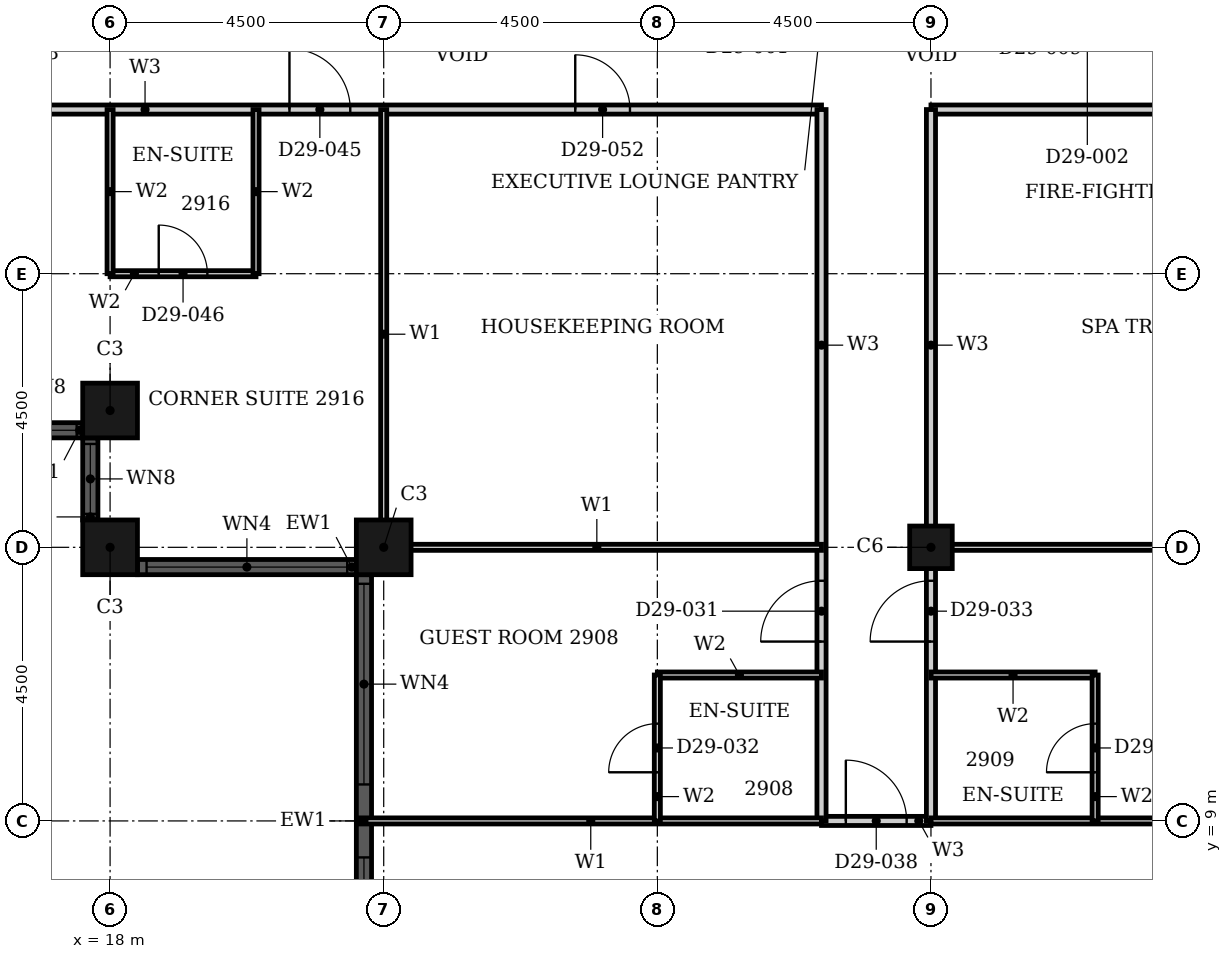
"""IFC4 building model, lengths in metres.
Left out: names, types, materials, properties, quantities, classifications, styles, units other than length and angle.
Written with IfcOpenShell. Run it as: python <this file> out.ifc"""

import sys

from ifc_helpers import new_model, si_unit, direction, frame, frame_2d, origin, origin_2d, place, context, subcontext, project, spatial, rectangle, hollow_rectangle, extrude, element, fill, save


model = new_model("IFC4")
c1 = context("Model", 3, precision=1e-05, world=origin(), true_north=direction((0.0, 1.0)))
c2 = subcontext(c1, "Body", "Model", "MODEL_VIEW")
j1 = project(units=[si_unit("LENGTHUNIT", "METRE"), si_unit("PLANEANGLEUNIT", "RADIAN")], contexts=[c1])
p1 = place(None, origin())
s1 = spatial("IfcSite", under=j1, at=p1, CompositionType="ELEMENT")
p2 = place(p1, origin())
s2 = spatial("IfcBuilding", under=s1, at=p2, CompositionType="ELEMENT")
p3 = place(p2, frame((0.0, 0.0, 118.8)))
s3 = spatial("IfcBuildingStorey", under=s2, at=p3, CompositionType="ELEMENT", Elevation=118.8)
for number, where, z_axis, x_axis in (
    (1, (18.0, 15.75, 0.0), (0.0, 0.0, 1.0), (1.0, 0.0, 0.0)),
    (2, (18.0, 13.5, 0.0), (0.0, 0.0, 1.0), (1.0, 0.0, 0.0)),
    (3, (22.5, 13.5, 0.0), (0.0, 0.0, 1.0), (1.0, 0.0, 0.0)),
):
    element("IfcColumn", number, at=place(p3, frame(where, z_axis=z_axis, x_axis=x_axis)), inside=s3, PredefinedType="COLUMN", context=c2, shape_type="SweptSolid", body=[
        extrude(hollow_rectangle(XDim=0.9, YDim=0.9, WallThickness=0.028, at=origin_2d()), origin(), (0.0, 0.0, 1.0), 3.6),
    ])
p4 = place(p3, frame((31.5, 13.5, 0.0), z_axis=(0.0, 0.0, 1.0), x_axis=(1.0, 0.0, 0.0)))
e4 = element("IfcColumn", 4, at=p4, inside=s3, PredefinedType="COLUMN", context=c2, shape_type="SweptSolid", body=[
    extrude(hollow_rectangle(XDim=0.7, YDim=0.7, WallThickness=0.022, at=origin_2d()), origin(), (0.0, 0.0, 1.0), 3.6),
])
p5 = place(p3, frame((16.2, 15.425, 0.0), z_axis=(0.0, 0.0, 1.0), x_axis=(1.0, 0.0, 0.0)))
e5 = element("IfcWall", 5, at=p5, inside=s3, PredefinedType="SOLIDWALL", context=c2, shape_type="SweptSolid", body=[
    extrude(rectangle(XDim=1.35, YDim=0.25, at=frame_2d((0.675, 0.0))), origin(), (0.0, 0.0, 1.0), 3.6),
])
p6 = place(p5, frame((0.1, 0.0, 0.9)))
e6 = element("IfcOpeningElement", 6, at=p6, cuts=e5, PredefinedType="OPENING", context=c2, shape_type="SweptSolid", body=[
    extrude(rectangle(XDim=1.15, YDim=2.08, at=frame_2d((0.575, 1.04))), frame((0.0, 0.135, 0.0), z_axis=(0.0, -1.0, 0.0), x_axis=(1.0, 0.0, 0.0)), (0.0, 0.0, 1.0), 0.27),
])
p7 = place(p3, frame((17.675, 15.3, 0.0), z_axis=(0.0, 0.0, 1.0), x_axis=(0.0, -1.0, 0.0)))
e7 = element("IfcWall", 7, at=p7, inside=s3, PredefinedType="SOLIDWALL", context=c2, shape_type="SweptSolid", body=[
    extrude(rectangle(XDim=1.35, YDim=0.25, at=frame_2d((0.675, 0.0))), origin(), (0.0, 0.0, 1.0), 3.6),
])
p8 = place(p7, frame((0.1, 0.0, 0.9)))
e8 = element("IfcOpeningElement", 8, at=p8, cuts=e7, PredefinedType="OPENING", context=c2, shape_type="SweptSolid", body=[
    extrude(rectangle(XDim=1.15, YDim=2.08, at=frame_2d((0.575, 1.04))), frame((0.0, 0.135, 0.0), z_axis=(0.0, -1.0, 0.0), x_axis=(1.0, 0.0, 0.0)), (0.0, 0.0, 1.0), 0.27),
])
p9 = place(p3, frame((18.45, 13.175, 0.0), z_axis=(0.0, 0.0, 1.0), x_axis=(1.0, 0.0, 0.0)))
e9 = element("IfcWall", 9, at=p9, inside=s3, PredefinedType="SOLIDWALL", context=c2, shape_type="SweptSolid", body=[
    extrude(rectangle(XDim=3.6, YDim=0.25, at=frame_2d((1.8, 0.0))), origin(), (0.0, 0.0, 1.0), 3.6),
])
p10 = place(p9, frame((0.15, 0.0, 0.9)))
e10 = element("IfcOpeningElement", 10, at=p10, cuts=e9, PredefinedType="OPENING", context=c2, shape_type="SweptSolid", body=[
    extrude(rectangle(XDim=3.3, YDim=2.08, at=frame_2d((1.65, 1.04))), frame((0.0, 0.135, 0.0), z_axis=(0.0, -1.0, 0.0), x_axis=(1.0, 0.0, 0.0)), (0.0, 0.0, 1.0), 0.27),
])
p11 = place(p3, frame((22.175, 13.05, 0.0), z_axis=(0.0, 0.0, 1.0), x_axis=(0.0, -1.0, 0.0)))
e11 = element("IfcWall", 11, at=p11, inside=s3, PredefinedType="SOLIDWALL", context=c2, shape_type="SweptSolid", body=[
    extrude(rectangle(XDim=8.1, YDim=0.25, at=frame_2d((4.05, 0.0))), origin(), (0.0, 0.0, 1.0), 3.6),
])
p12 = place(p11, frame((0.15, 0.0, 0.9)))
e12 = element("IfcOpeningElement", 12, at=p12, cuts=e11, PredefinedType="OPENING", context=c2, shape_type="SweptSolid", body=[
    extrude(rectangle(XDim=3.3, YDim=2.08, at=frame_2d((1.65, 1.04))), frame((0.0, 0.135, 0.0), z_axis=(0.0, -1.0, 0.0), x_axis=(1.0, 0.0, 0.0)), (0.0, 0.0, 1.0), 0.27),
])
p13 = place(p11, frame((4.65, 0.0, 0.9)))
e13 = element("IfcOpeningElement", 13, at=p13, cuts=e11, PredefinedType="OPENING", context=c2, shape_type="SweptSolid", body=[
    extrude(rectangle(XDim=3.3, YDim=2.08, at=frame_2d((1.65, 1.04))), frame((0.0, 0.135, 0.0), z_axis=(0.0, -1.0, 0.0), x_axis=(1.0, 0.0, 0.0)), (0.0, 0.0, 1.0), 0.27),
])
p14 = place(p3, frame((16.2, 20.7, 0.0), z_axis=(0.0, 0.0, 1.0), x_axis=(1.0, 0.0, 0.0)))
e14 = element("IfcWall", 14, at=p14, inside=s3, PredefinedType="PARTITIONING", context=c2, shape_type="SweptSolid", body=[
    extrude(rectangle(XDim=13.5, YDim=0.15, at=frame_2d((6.75, 0.0))), origin(), (0.0, 0.0, 1.0), 3.3),
])
p15 = place(p14, frame((4.75, 0.0, 0.0)))
e15 = element("IfcOpeningElement", 15, at=p15, cuts=e14, PredefinedType="OPENING", context=c2, shape_type="SweptSolid", body=[
    extrude(rectangle(XDim=1.0, YDim=2.1, at=frame_2d((0.5, 1.05))), frame((0.0, 0.085, 0.0), z_axis=(0.0, -1.0, 0.0), x_axis=(1.0, 0.0, 0.0)), (0.0, 0.0, 1.0), 0.17),
])
p16 = place(p14, frame((9.45, 0.0, 0.0)))
e16 = element("IfcOpeningElement", 16, at=p16, cuts=e14, PredefinedType="OPENING", context=c2, shape_type="SweptSolid", body=[
    extrude(rectangle(XDim=0.9, YDim=2.1, at=frame_2d((0.45, 1.05))), frame((0.0, 0.085, 0.0), z_axis=(0.0, -1.0, 0.0), x_axis=(1.0, 0.0, 0.0)), (0.0, 0.0, 1.0), 0.17),
])
p17 = place(p3, frame((31.5, 20.7, 0.0), z_axis=(0.0, 0.0, 1.0), x_axis=(1.0, 0.0, 0.0)))
e17 = element("IfcWall", 17, at=p17, inside=s3, PredefinedType="PARTITIONING", context=c2, shape_type="SweptSolid", body=[
    extrude(rectangle(XDim=15.3, YDim=0.15, at=frame_2d((7.65, 0.0))), origin(), (0.0, 0.0, 1.0), 3.3),
])
p18 = place(p17, frame((11.95, 0.0, 0.0)))
e18 = element("IfcOpeningElement", 18, at=p18, cuts=e17, PredefinedType="OPENING", context=c2, shape_type="SweptSolid", body=[
    extrude(rectangle(XDim=1.0, YDim=2.1, at=frame_2d((0.5, 1.05))), frame((0.0, 0.085, 0.0), z_axis=(0.0, -1.0, 0.0), x_axis=(1.0, 0.0, 0.0)), (0.0, 0.0, 1.0), 0.17),
])
p19 = place(p17, frame((13.95, 0.0, 0.0)))
e19 = element("IfcOpeningElement", 19, at=p19, cuts=e17, PredefinedType="OPENING", context=c2, shape_type="SweptSolid", body=[
    extrude(rectangle(XDim=0.9, YDim=2.1, at=frame_2d((0.45, 1.05))), frame((0.0, 0.085, 0.0), z_axis=(0.0, -1.0, 0.0), x_axis=(1.0, 0.0, 0.0)), (0.0, 0.0, 1.0), 0.17),
])
p20 = place(p17, frame((4.05, 0.0, 0.0)))
e20 = element("IfcOpeningElement", 20, at=p20, cuts=e17, PredefinedType="OPENING", context=c2, shape_type="SweptSolid", body=[
    extrude(rectangle(XDim=0.9, YDim=2.1, at=frame_2d((0.45, 1.05))), frame((0.0, 0.085, 0.0), z_axis=(0.0, -1.0, 0.0), x_axis=(1.0, 0.0, 0.0)), (0.0, 0.0, 1.0), 0.17),
])
p21 = place(p3, frame((29.7, 9.0, 0.0), z_axis=(0.0, 0.0, 1.0), x_axis=(1.0, 0.0, 0.0)))
e21 = element("IfcWall", 21, at=p21, inside=s3, PredefinedType="PARTITIONING", context=c2, shape_type="SweptSolid", body=[
    extrude(rectangle(XDim=1.8, YDim=0.15, at=frame_2d((0.9, 0.0))), origin(), (0.0, 0.0, 1.0), 3.3),
])
p22 = place(p21, frame((0.4, 0.0, 0.0)))
e22 = element("IfcOpeningElement", 22, at=p22, cuts=e21, PredefinedType="OPENING", context=c2, shape_type="SweptSolid", body=[
    extrude(rectangle(XDim=1.0, YDim=2.1, at=frame_2d((0.5, 1.05))), frame((0.0, 0.085, 0.0), z_axis=(0.0, -1.0, 0.0), x_axis=(1.0, 0.0, 0.0)), (0.0, 0.0, 1.0), 0.17),
])
p23 = place(p3, frame((29.7, 9.0, 0.0), z_axis=(0.0, 0.0, 1.0), x_axis=(0.0, 1.0, 0.0)))
e23 = element("IfcWall", 23, at=p23, inside=s3, PredefinedType="PARTITIONING", context=c2, shape_type="SweptSolid", body=[
    extrude(rectangle(XDim=11.7, YDim=0.15, at=frame_2d((5.85, 0.0))), origin(), (0.0, 0.0, 1.0), 3.3),
])
p24 = place(p23, frame((2.95, 0.0, 0.0)))
e24 = element("IfcOpeningElement", 24, at=p24, cuts=e23, PredefinedType="OPENING", context=c2, shape_type="SweptSolid", body=[
    extrude(rectangle(XDim=1.0, YDim=2.1, at=frame_2d((0.5, 1.05))), frame((0.0, 0.085, 0.0), z_axis=(0.0, -1.0, 0.0), x_axis=(1.0, 0.0, 0.0)), (0.0, 0.0, 1.0), 0.17),
])
p25 = place(p3, frame((31.5, 9.0, 0.0), z_axis=(0.0, 0.0, 1.0), x_axis=(0.0, 1.0, 0.0)))
e25 = element("IfcWall", 25, at=p25, inside=s3, PredefinedType="PARTITIONING", context=c2, shape_type="SweptSolid", body=[
    extrude(rectangle(XDim=11.7, YDim=0.15, at=frame_2d((5.85, 0.0))), origin(), (0.0, 0.0, 1.0), 2.58),
])
p26 = place(p25, frame((2.95, 0.0, 0.0)))
e26 = element("IfcOpeningElement", 26, at=p26, cuts=e25, PredefinedType="OPENING", context=c2, shape_type="SweptSolid", body=[
    extrude(rectangle(XDim=1.0, YDim=2.1, at=frame_2d((0.5, 1.05))), frame((0.0, 0.085, 0.0), z_axis=(0.0, -1.0, 0.0), x_axis=(1.0, 0.0, 0.0)), (0.0, 0.0, 1.0), 0.17),
])
p27 = place(p3, frame((31.5, 13.5, 0.0), z_axis=(0.0, 0.0, 1.0), x_axis=(1.0, 0.0, 0.0)))
e27 = element("IfcWall", 27, at=p27, inside=s3, PredefinedType="PARTITIONING", context=c2, shape_type="SweptSolid", body=[
    extrude(rectangle(XDim=9.19, YDim=0.1, at=frame_2d((4.595, 0.0))), origin(), (0.0, 0.0, 1.0), 2.38),
])
p28 = place(p3, frame((22.31, 13.5, 0.0), z_axis=(0.0, 0.0, 1.0), x_axis=(1.0, 0.0, 0.0)))
e28 = element("IfcWall", 28, at=p28, inside=s3, PredefinedType="PARTITIONING", context=c2, shape_type="SweptSolid", body=[
    extrude(rectangle(XDim=7.39, YDim=0.1, at=frame_2d((3.695, 0.0))), origin(), (0.0, 0.0, 1.0), 2.38),
])
p29 = place(p3, frame((31.5, 9.0, 0.0), z_axis=(0.0, 0.0, 1.0), x_axis=(1.0, 0.0, 0.0)))
e29 = element("IfcWall", 29, at=p29, inside=s3, PredefinedType="PARTITIONING", context=c2, shape_type="SweptSolid", body=[
    extrude(rectangle(XDim=9.39, YDim=0.1, at=frame_2d((4.695, 0.0))), origin(), (0.0, 0.0, 1.0), 3.3),
])
p30 = place(p3, frame((22.11, 9.0, 0.0), z_axis=(0.0, 0.0, 1.0), x_axis=(1.0, 0.0, 0.0)))
e30 = element("IfcWall", 30, at=p30, inside=s3, PredefinedType="PARTITIONING", context=c2, shape_type="SweptSolid", body=[
    extrude(rectangle(XDim=7.59, YDim=0.1, at=frame_2d((3.795, 0.0))), origin(), (0.0, 0.0, 1.0), 3.3),
])
p31 = place(p3, frame((22.5, 13.31, 0.0), z_axis=(0.0, 0.0, 1.0), x_axis=(0.0, 1.0, 0.0)))
e31 = element("IfcWall", 31, at=p31, inside=s3, PredefinedType="PARTITIONING", context=c2, shape_type="SweptSolid", body=[
    extrude(rectangle(XDim=7.39, YDim=0.1, at=frame_2d((3.695, 0.0))), origin(), (0.0, 0.0, 1.0), 3.3),
])
for number, where, z_axis, x_axis in (
    (32, (31.5, 11.4, 0.0), (0.0, 0.0, 1.0), (1.0, 0.0, 0.0)),
    (33, (27.0, 11.4, 0.0), (0.0, 0.0, 1.0), (1.0, 0.0, 0.0)),
):
    element("IfcWall", number, at=place(p3, frame(where, z_axis=z_axis, x_axis=x_axis)), inside=s3, PredefinedType="PARTITIONING", context=c2, shape_type="SweptSolid", body=[
        extrude(rectangle(XDim=2.7, YDim=0.1, at=frame_2d((1.35, 0.0))), origin(), (0.0, 0.0, 1.0), 3.3),
    ])
p32 = place(p3, frame((18.0, 18.0, 0.0), z_axis=(0.0, 0.0, 1.0), x_axis=(1.0, 0.0, 0.0)))
e34 = element("IfcWall", 34, at=p32, inside=s3, PredefinedType="PARTITIONING", context=c2, shape_type="SweptSolid", body=[
    extrude(rectangle(XDim=2.4, YDim=0.1, at=frame_2d((1.2, 0.0))), origin(), (0.0, 0.0, 1.0), 3.3),
])
p33 = place(p32, frame((0.8, 0.0, 0.0)))
e35 = element("IfcOpeningElement", 35, at=p33, cuts=e34, PredefinedType="OPENING", context=c2, shape_type="SweptSolid", body=[
    extrude(rectangle(XDim=0.8, YDim=2.1, at=frame_2d((0.4, 1.05))), frame((0.0, 0.06, 0.0), z_axis=(0.0, -1.0, 0.0), x_axis=(1.0, 0.0, 0.0)), (0.0, 0.0, 1.0), 0.12),
])
for number, where, z_axis, x_axis in (
    (36, (18.0, 18.0, 0.0), (0.0, 0.0, 1.0), (0.0, 1.0, 0.0)),
    (37, (20.4, 18.0, 0.0), (0.0, 0.0, 1.0), (0.0, 1.0, 0.0)),
):
    element("IfcWall", number, at=place(p3, frame(where, z_axis=z_axis, x_axis=x_axis)), inside=s3, PredefinedType="PARTITIONING", context=c2, shape_type="SweptSolid", body=[
        extrude(rectangle(XDim=2.7, YDim=0.1, at=frame_2d((1.35, 0.0))), origin(), (0.0, 0.0, 1.0), 3.3),
    ])
p34 = place(p3, frame((27.0, 9.0, 0.0), z_axis=(0.0, 0.0, 1.0), x_axis=(0.0, 1.0, 0.0)))
e38 = element("IfcWall", 38, at=p34, inside=s3, PredefinedType="PARTITIONING", context=c2, shape_type="SweptSolid", body=[
    extrude(rectangle(XDim=2.4, YDim=0.1, at=frame_2d((1.2, 0.0))), origin(), (0.0, 0.0, 1.0), 2.58),
])
p35 = place(p34, frame((0.8, 0.0, 0.0)))
e39 = element("IfcOpeningElement", 39, at=p35, cuts=e38, PredefinedType="OPENING", context=c2, shape_type="SweptSolid", body=[
    extrude(rectangle(XDim=0.8, YDim=2.1, at=frame_2d((0.4, 1.05))), frame((0.0, 0.06, 0.0), z_axis=(0.0, -1.0, 0.0), x_axis=(1.0, 0.0, 0.0)), (0.0, 0.0, 1.0), 0.12),
])
p36 = place(p3, frame((34.2, 9.0, 0.0), z_axis=(0.0, 0.0, 1.0), x_axis=(0.0, 1.0, 0.0)))
e40 = element("IfcWall", 40, at=p36, inside=s3, PredefinedType="PARTITIONING", context=c2, shape_type="SweptSolid", body=[
    extrude(rectangle(XDim=2.4, YDim=0.1, at=frame_2d((1.2, 0.0))), origin(), (0.0, 0.0, 1.0), 3.3),
])
p37 = place(p36, frame((0.8, 0.0, 0.0)))
e41 = element("IfcOpeningElement", 41, at=p37, cuts=e40, PredefinedType="OPENING", context=c2, shape_type="SweptSolid", body=[
    extrude(rectangle(XDim=0.8, YDim=2.1, at=frame_2d((0.4, 1.05))), frame((0.0, 0.06, 0.0), z_axis=(0.0, -1.0, 0.0), x_axis=(1.0, 0.0, 0.0)), (0.0, 0.0, 1.0), 0.12),
])
p38 = place(p6, origin())
e42 = element("IfcWindow", 42, at=p38, inside=s3, PartitioningType="SINGLE_PANEL", PredefinedType="WINDOW", context=c2, shape_type="SweptSolid", body=[
    extrude(rectangle(XDim=1.15, YDim=2.08, at=frame_2d((0.575, 1.04))), frame((0.0, 0.03, 0.0), z_axis=(0.0, -1.0, 0.0), x_axis=(1.0, 0.0, 0.0)), (0.0, 0.0, 1.0), 0.06),
])
fill(e6, e42)
p39 = place(p8, origin())
e43 = element("IfcWindow", 43, at=p39, inside=s3, PartitioningType="SINGLE_PANEL", PredefinedType="WINDOW", context=c2, shape_type="SweptSolid", body=[
    extrude(rectangle(XDim=1.15, YDim=2.08, at=frame_2d((0.575, 1.04))), frame((0.0, 0.03, 0.0), z_axis=(0.0, -1.0, 0.0), x_axis=(1.0, 0.0, 0.0)), (0.0, 0.0, 1.0), 0.06),
])
fill(e8, e43)
p40 = place(p10, origin())
e44 = element("IfcWindow", 44, at=p40, inside=s3, PartitioningType="SINGLE_PANEL", PredefinedType="WINDOW", context=c2, shape_type="SweptSolid", body=[
    extrude(rectangle(XDim=3.3, YDim=2.08, at=frame_2d((1.65, 1.04))), frame((0.0, 0.03, 0.0), z_axis=(0.0, -1.0, 0.0), x_axis=(1.0, 0.0, 0.0)), (0.0, 0.0, 1.0), 0.06),
])
fill(e10, e44)
p41 = place(p12, origin())
e45 = element("IfcWindow", 45, at=p41, inside=s3, PartitioningType="SINGLE_PANEL", PredefinedType="WINDOW", context=c2, shape_type="SweptSolid", body=[
    extrude(rectangle(XDim=3.3, YDim=2.08, at=frame_2d((1.65, 1.04))), frame((0.0, 0.03, 0.0), z_axis=(0.0, -1.0, 0.0), x_axis=(1.0, 0.0, 0.0)), (0.0, 0.0, 1.0), 0.06),
])
fill(e12, e45)
p42 = place(p13, origin())
e46 = element("IfcWindow", 46, at=p42, inside=s3, PartitioningType="SINGLE_PANEL", PredefinedType="WINDOW", context=c2, shape_type="SweptSolid", body=[
    extrude(rectangle(XDim=3.3, YDim=2.08, at=frame_2d((1.65, 1.04))), frame((0.0, 0.03, 0.0), z_axis=(0.0, -1.0, 0.0), x_axis=(1.0, 0.0, 0.0)), (0.0, 0.0, 1.0), 0.06),
])
fill(e13, e46)
p43 = place(p24, origin())
e47 = element("IfcDoor", 47, at=p43, inside=s3, OperationType="SINGLE_SWING_RIGHT", PredefinedType="DOOR", context=c2, shape_type="SweptSolid", body=[
    extrude(rectangle(XDim=1.0, YDim=2.1, at=frame_2d((0.5, 1.05))), frame((0.0, 0.025, 0.0), z_axis=(0.0, -1.0, 0.0), x_axis=(1.0, 0.0, 0.0)), (0.0, 0.0, 1.0), 0.05),
])
fill(e24, e47)
p44 = place(p35, origin())
e48 = element("IfcDoor", 48, at=p44, inside=s3, OperationType="SINGLE_SWING_RIGHT", PredefinedType="DOOR", context=c2, shape_type="SweptSolid", body=[
    extrude(rectangle(XDim=0.8, YDim=2.1, at=frame_2d((0.4, 1.05))), frame((0.0, 0.025, 0.0), z_axis=(0.0, -1.0, 0.0), x_axis=(1.0, 0.0, 0.0)), (0.0, 0.0, 1.0), 0.05),
])
fill(e39, e48)
p45 = place(p26, origin())
e49 = element("IfcDoor", 49, at=p45, inside=s3, OperationType="SINGLE_SWING_RIGHT", PredefinedType="DOOR", context=c2, shape_type="SweptSolid", body=[
    extrude(rectangle(XDim=1.0, YDim=2.1, at=frame_2d((0.5, 1.05))), frame((0.0, 0.025, 0.0), z_axis=(0.0, -1.0, 0.0), x_axis=(1.0, 0.0, 0.0)), (0.0, 0.0, 1.0), 0.05),
])
fill(e26, e49)
p46 = place(p37, origin())
e50 = element("IfcDoor", 50, at=p46, inside=s3, OperationType="SINGLE_SWING_RIGHT", PredefinedType="DOOR", context=c2, shape_type="SweptSolid", body=[
    extrude(rectangle(XDim=0.8, YDim=2.1, at=frame_2d((0.4, 1.05))), frame((0.0, 0.025, 0.0), z_axis=(0.0, -1.0, 0.0), x_axis=(1.0, 0.0, 0.0)), (0.0, 0.0, 1.0), 0.05),
])
fill(e41, e50)
p47 = place(p22, origin())
e51 = element("IfcDoor", 51, at=p47, inside=s3, OperationType="SINGLE_SWING_RIGHT", PredefinedType="DOOR", context=c2, shape_type="SweptSolid", body=[
    extrude(rectangle(XDim=1.0, YDim=2.1, at=frame_2d((0.5, 1.05))), frame((0.0, 0.025, 0.0), z_axis=(0.0, -1.0, 0.0), x_axis=(1.0, 0.0, 0.0)), (0.0, 0.0, 1.0), 0.05),
])
fill(e22, e51)
p48 = place(p15, origin())
e52 = element("IfcDoor", 52, at=p48, inside=s3, OperationType="SINGLE_SWING_RIGHT", PredefinedType="DOOR", context=c2, shape_type="SweptSolid", body=[
    extrude(rectangle(XDim=1.0, YDim=2.1, at=frame_2d((0.5, 1.05))), frame((0.0, 0.025, 0.0), z_axis=(0.0, -1.0, 0.0), x_axis=(1.0, 0.0, 0.0)), (0.0, 0.0, 1.0), 0.05),
])
fill(e15, e52)
p49 = place(p33, origin())
e53 = element("IfcDoor", 53, at=p49, inside=s3, OperationType="SINGLE_SWING_LEFT", PredefinedType="DOOR", context=c2, shape_type="SweptSolid", body=[
    extrude(rectangle(XDim=0.8, YDim=2.1, at=frame_2d((0.4, 1.05))), frame((0.0, 0.025, 0.0), z_axis=(0.0, -1.0, 0.0), x_axis=(1.0, 0.0, 0.0)), (0.0, 0.0, 1.0), 0.05),
])
fill(e35, e53)
p50 = place(p16, origin())
e54 = element("IfcDoor", 54, at=p50, inside=s3, OperationType="SINGLE_SWING_RIGHT", PredefinedType="DOOR", context=c2, shape_type="SweptSolid", body=[
    extrude(rectangle(XDim=0.9, YDim=2.1, at=frame_2d((0.45, 1.05))), frame((0.0, 0.025, 0.0), z_axis=(0.0, -1.0, 0.0), x_axis=(1.0, 0.0, 0.0)), (0.0, 0.0, 1.0), 0.05),
])
fill(e16, e54)
save(model, sys.argv[1])
